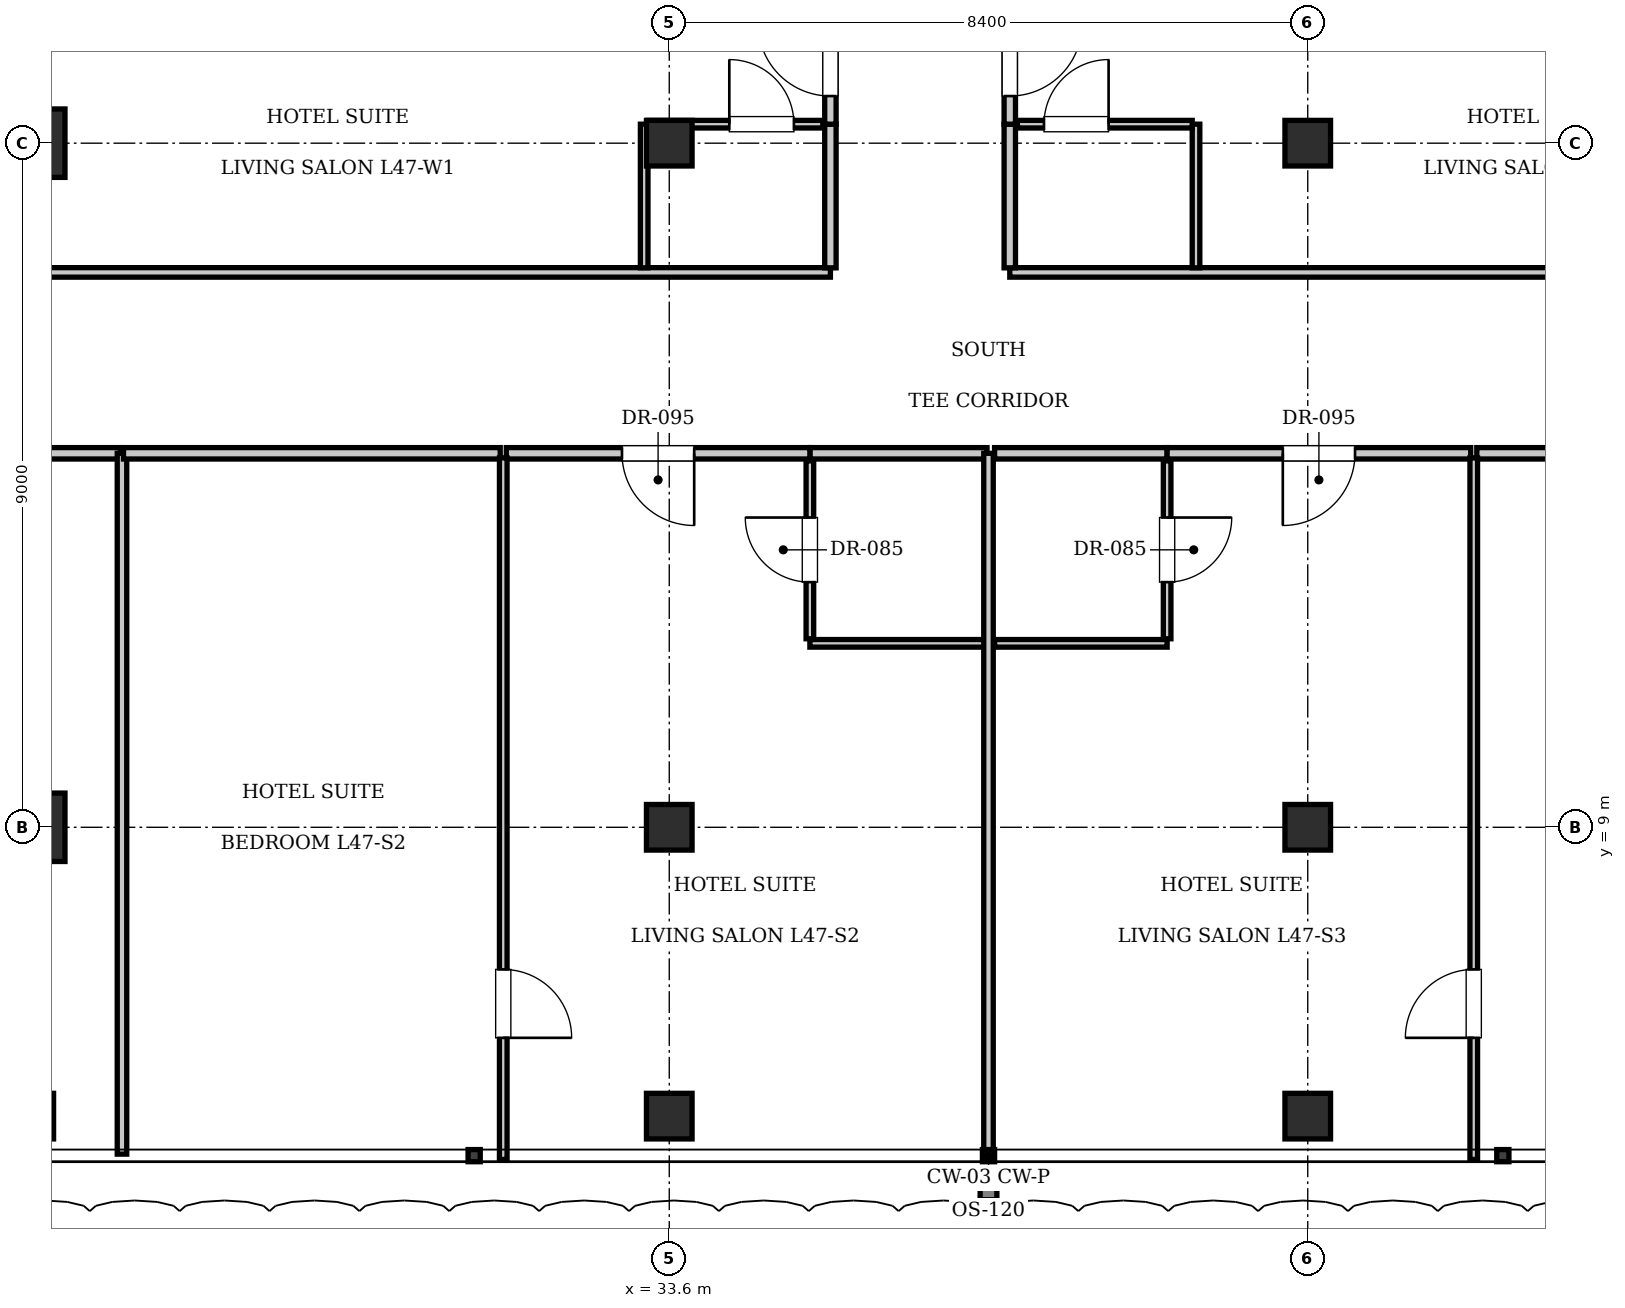
"""IFC4 building model, lengths in metres.
Left out: names, types, materials, properties, quantities, classifications, styles, units other than length and angle.
Written with IfcOpenShell. Run it as: python <this file> out.ifc"""

import sys

from ifc_helpers import new_model, si_unit, direction, frame, frame_2d, origin, origin_2d, place, context, subcontext, project, spatial, rectangle, i_section, extrude, element, fill, save


model = new_model("IFC4")
c1 = context("Model", 3, precision=1e-05, world=origin(), true_north=direction((0.0, 1.0)))
c2 = subcontext(c1, "Body", "Model", "MODEL_VIEW")
j1 = project(units=[si_unit("LENGTHUNIT", "METRE"), si_unit("PLANEANGLEUNIT", "RADIAN")], contexts=[c1])
p1 = place(None, origin())
s1 = spatial("IfcSite", under=j1, at=p1, CompositionType="ELEMENT")
p2 = place(p1, origin())
s2 = spatial("IfcBuilding", under=s1, at=p2, CompositionType="ELEMENT")
p3 = place(p2, frame((0.0, 0.0, 192.85)))
s3 = spatial("IfcBuildingStorey", under=s2, at=p3, CompositionType="ELEMENT", Elevation=192.85)
for number, where, z_axis, x_axis in (
    (1, (25.2, 18.0, 0.0), (0.0, 0.0, 1.0), (1.0, 0.0, 0.0)),
    (2, (25.2, 9.0, 0.0), (0.0, 0.0, 1.0), (1.0, 0.0, 0.0)),
):
    element("IfcColumn", number, at=place(p3, frame(where, z_axis=z_axis, x_axis=x_axis)), inside=s3, PredefinedType="COLUMN", context=c2, shape_type="SweptSolid", body=[
        extrude(rectangle(XDim=0.9, YDim=0.9, at=origin_2d()), origin(), (0.0, 0.0, 1.0), 3.85),
    ])
for number, where, z_axis, x_axis in (
    (3, (33.6, 9.0, 0.0), (0.0, 0.0, 1.0), (1.0, 0.0, 0.0)),
    (4, (42.0, 9.0, 0.0), (0.0, 0.0, 1.0), (1.0, 0.0, 0.0)),
    (5, (33.6, 18.0, 0.0), (0.0, 0.0, 1.0), (1.0, 0.0, 0.0)),
    (6, (42.0, 18.0, 0.0), (0.0, 0.0, 1.0), (1.0, 0.0, 0.0)),
    (7, (25.2, 5.2, 0.0), (0.0, 0.0, 1.0), (1.0, 0.0, 0.0)),
    (8, (33.6, 5.2, 0.0), (0.0, 0.0, 1.0), (1.0, 0.0, 0.0)),
    (9, (42.0, 5.2, 0.0), (0.0, 0.0, 1.0), (1.0, 0.0, 0.0)),
):
    element("IfcColumn", number, at=place(p3, frame(where, z_axis=z_axis, x_axis=x_axis)), inside=s3, PredefinedType="COLUMN", context=c2, shape_type="SweptSolid", body=[
        extrude(i_section(OverallWidth=0.6, OverallDepth=0.6, WebThickness=0.025, FlangeThickness=0.038, at=origin_2d()), origin(), (0.0, 0.0, 1.0), 3.85),
    ])
p4 = place(p3, frame((22.524, 13.92, 0.0), z_axis=(0.0, 0.0, 1.0), x_axis=(1.0, 0.0, 0.0)))
e10 = element("IfcWall", 10, at=p4, inside=s3, PredefinedType="PARTITIONING", context=c2, shape_type="SweptSolid", body=[
    extrude(rectangle(XDim=3.856, YDim=0.15, at=frame_2d((1.928, 0.0))), origin(), (0.0, 0.0, 1.0), 3.61),
])
p5 = place(p3, frame((26.4, 4.7, 0.0), z_axis=(0.0, 0.0, 1.0), x_axis=(0.0, 1.0, 0.0)))
e11 = element("IfcWall", 11, at=p5, inside=s3, PredefinedType="PARTITIONING", context=c2, shape_type="SweptSolid", body=[
    extrude(rectangle(XDim=9.22, YDim=0.125, at=frame_2d((4.61, 0.0))), origin(), (0.0, 0.0, 1.0), 3.61),
])
p6 = place(p3, frame((35.45, 13.92, 0.0), z_axis=(0.0, 0.0, 1.0), x_axis=(1.0, 0.0, 0.0)))
e12 = element("IfcWall", 12, at=p6, inside=s3, PredefinedType="PARTITIONING", context=c2, shape_type="SweptSolid", body=[
    extrude(rectangle(XDim=2.33, YDim=0.15, at=frame_2d((1.165, 0.0))), origin(), (0.0, 0.0, 1.0), 3.61),
])
p7 = place(p3, frame((35.45, 11.42, 0.0), z_axis=(0.0, 0.0, 1.0), x_axis=(1.0, 0.0, 0.0)))
e13 = element("IfcWall", 13, at=p7, inside=s3, PredefinedType="PARTITIONING", context=c2, shape_type="SweptSolid", body=[
    extrude(rectangle(XDim=2.31, YDim=0.1, at=frame_2d((1.155, 0.0))), origin(), (0.0, 0.0, 1.0), 3.61),
])
p8 = place(p3, frame((35.45, 11.48, 0.0), z_axis=(0.0, 0.0, 1.0), x_axis=(0.0, 1.0, 0.0)))
e14 = element("IfcWall", 14, at=p8, inside=s3, PredefinedType="PARTITIONING", context=c2, shape_type="SweptSolid", body=[
    extrude(rectangle(XDim=2.34, YDim=0.1, at=frame_2d((1.17, 0.0))), origin(), (0.0, 0.0, 1.0), 3.61),
])
p9 = place(p8, frame((0.745, 0.0, 0.0)))
e15 = element("IfcOpeningElement", 15, at=p9, cuts=e14, PredefinedType="OPENING", context=c2, shape_type="SweptSolid", body=[
    extrude(rectangle(XDim=0.85, YDim=2.1, at=frame_2d((0.425, 1.05))), frame((0.0, 0.06, 0.0), z_axis=(0.0, -1.0, 0.0), x_axis=(1.0, 0.0, 0.0)), (0.0, 0.0, 1.0), 0.12),
])
p10 = place(p3, frame((26.42, 13.92, 0.0), z_axis=(0.0, 0.0, 1.0), x_axis=(1.0, 0.0, 0.0)))
e16 = element("IfcWall", 16, at=p10, inside=s3, PredefinedType="PARTITIONING", context=c2, shape_type="SweptSolid", body=[
    extrude(rectangle(XDim=4.956, YDim=0.15, at=frame_2d((2.478, 0.0))), origin(), (0.0, 0.0, 1.0), 3.61),
])
p11 = place(p3, frame((31.456, 13.92, 0.0), z_axis=(0.0, 0.0, 1.0), x_axis=(1.0, 0.0, 0.0)))
e17 = element("IfcWall", 17, at=p11, inside=s3, PredefinedType="PARTITIONING", context=c2, shape_type="SweptSolid", body=[
    extrude(rectangle(XDim=3.994, YDim=0.15, at=frame_2d((1.997, 0.0))), origin(), (0.0, 0.0, 1.0), 3.61),
])
p12 = place(p11, frame((1.522, 0.0, 0.0)))
e18 = element("IfcOpeningElement", 18, at=p12, cuts=e17, PredefinedType="OPENING", context=c2, shape_type="SweptSolid", body=[
    extrude(rectangle(XDim=0.95, YDim=2.15, at=frame_2d((0.475, 1.075))), frame((0.0, 0.085, 0.0), z_axis=(0.0, -1.0, 0.0), x_axis=(1.0, 0.0, 0.0)), (0.0, 0.0, 1.0), 0.17),
])
p13 = place(p3, frame((31.416, 4.63, 0.0), z_axis=(0.0, 0.0, 1.0), x_axis=(0.0, 1.0, 0.0)))
e19 = element("IfcWall", 19, at=p13, inside=s3, PredefinedType="PARTITIONING", context=c2, shape_type="SweptSolid", body=[
    extrude(rectangle(XDim=9.23, YDim=0.1, at=frame_2d((4.615, 0.0))), origin(), (0.0, 0.0, 1.0), 3.61),
])
p14 = place(p13, frame((1.6, 0.0, 0.0)))
e20 = element("IfcOpeningElement", 20, at=p14, cuts=e19, PredefinedType="OPENING", context=c2, shape_type="SweptSolid", body=[
    extrude(rectangle(XDim=0.9, YDim=2.1, at=frame_2d((0.45, 1.05))), frame((0.0, 0.06, 0.0), z_axis=(0.0, -1.0, 0.0), x_axis=(1.0, 0.0, 0.0)), (0.0, 0.0, 1.0), 0.12),
])
p15 = place(p3, frame((37.8, 4.7, 0.0), z_axis=(0.0, 0.0, 1.0), x_axis=(0.0, 1.0, 0.0)))
e21 = element("IfcWall", 21, at=p15, inside=s3, PredefinedType="PARTITIONING", context=c2, shape_type="SweptSolid", body=[
    extrude(rectangle(XDim=9.22, YDim=0.125, at=frame_2d((4.61, 0.0))), origin(), (0.0, 0.0, 1.0), 3.3),
])
p16 = place(p3, frame((37.88, 13.92, 0.0), z_axis=(0.0, 0.0, 1.0), x_axis=(1.0, 0.0, 0.0)))
e22 = element("IfcWall", 22, at=p16, inside=s3, PredefinedType="PARTITIONING", context=c2, shape_type="SweptSolid", body=[
    extrude(rectangle(XDim=2.27, YDim=0.15, at=frame_2d((1.135, 0.0))), origin(), (0.0, 0.0, 1.0), 3.61),
])
p17 = place(p3, frame((37.88, 11.42, 0.0), z_axis=(0.0, 0.0, 1.0), x_axis=(1.0, 0.0, 0.0)))
e23 = element("IfcWall", 23, at=p17, inside=s3, PredefinedType="PARTITIONING", context=c2, shape_type="SweptSolid", body=[
    extrude(rectangle(XDim=2.27, YDim=0.1, at=frame_2d((1.135, 0.0))), origin(), (0.0, 0.0, 1.0), 3.61),
])
p18 = place(p3, frame((40.15, 11.48, 0.0), z_axis=(0.0, 0.0, 1.0), x_axis=(0.0, 1.0, 0.0)))
e24 = element("IfcWall", 24, at=p18, inside=s3, PredefinedType="PARTITIONING", context=c2, shape_type="SweptSolid", body=[
    extrude(rectangle(XDim=2.34, YDim=0.1, at=frame_2d((1.17, 0.0))), origin(), (0.0, 0.0, 1.0), 3.61),
])
p19 = place(p18, frame((0.745, 0.0, 0.0)))
e25 = element("IfcOpeningElement", 25, at=p19, cuts=e24, PredefinedType="OPENING", context=c2, shape_type="SweptSolid", body=[
    extrude(rectangle(XDim=0.85, YDim=2.1, at=frame_2d((0.425, 1.05))), frame((0.0, 0.06, 0.0), z_axis=(0.0, -1.0, 0.0), x_axis=(1.0, 0.0, 0.0)), (0.0, 0.0, 1.0), 0.12),
])
p20 = place(p3, frame((40.15, 13.92, 0.0), z_axis=(0.0, 0.0, 1.0), x_axis=(1.0, 0.0, 0.0)))
e26 = element("IfcWall", 26, at=p20, inside=s3, PredefinedType="PARTITIONING", context=c2, shape_type="SweptSolid", body=[
    extrude(rectangle(XDim=3.994, YDim=0.15, at=frame_2d((1.997, 0.0))), origin(), (0.0, 0.0, 1.0), 3.61),
])
p21 = place(p20, frame((1.522, 0.0, 0.0)))
e27 = element("IfcOpeningElement", 27, at=p21, cuts=e26, PredefinedType="OPENING", context=c2, shape_type="SweptSolid", body=[
    extrude(rectangle(XDim=0.95, YDim=2.15, at=frame_2d((0.475, 1.075))), frame((0.0, 0.085, 0.0), z_axis=(0.0, -1.0, 0.0), x_axis=(1.0, 0.0, 0.0)), (0.0, 0.0, 1.0), 0.17),
])
p22 = place(p3, frame((44.224, 13.92, 0.0), z_axis=(0.0, 0.0, 1.0), x_axis=(1.0, 0.0, 0.0)))
e28 = element("IfcWall", 28, at=p22, inside=s3, PredefinedType="PARTITIONING", context=c2, shape_type="SweptSolid", body=[
    extrude(rectangle(XDim=4.956, YDim=0.15, at=frame_2d((2.478, 0.0))), origin(), (0.0, 0.0, 1.0), 3.61),
])
p23 = place(p3, frame((44.184, 4.63, 0.0), z_axis=(0.0, 0.0, 1.0), x_axis=(0.0, 1.0, 0.0)))
e29 = element("IfcWall", 29, at=p23, inside=s3, PredefinedType="PARTITIONING", context=c2, shape_type="SweptSolid", body=[
    extrude(rectangle(XDim=9.23, YDim=0.1, at=frame_2d((4.615, 0.0))), origin(), (0.0, 0.0, 1.0), 3.61),
])
p24 = place(p23, frame((1.6, 0.0, 0.0)))
e30 = element("IfcOpeningElement", 30, at=p24, cuts=e29, PredefinedType="OPENING", context=c2, shape_type="SweptSolid", body=[
    extrude(rectangle(XDim=0.9, YDim=2.1, at=frame_2d((0.45, 1.05))), frame((0.0, 0.06, 0.0), z_axis=(0.0, -1.0, 0.0), x_axis=(1.0, 0.0, 0.0)), (0.0, 0.0, 1.0), 0.12),
])
p25 = place(p3, frame((13.2, 16.3, 0.0), z_axis=(0.0, 0.0, 1.0), x_axis=(1.0, 0.0, 0.0)))
e31 = element("IfcWall", 31, at=p25, inside=s3, PredefinedType="PARTITIONING", context=c2, shape_type="SweptSolid", body=[
    extrude(rectangle(XDim=22.52, YDim=0.125, at=frame_2d((11.26, 0.0))), origin(), (0.0, 0.0, 1.0), 3.61),
])
p26 = place(p3, frame((38.08, 16.3, 0.0), z_axis=(0.0, 0.0, 1.0), x_axis=(1.0, 0.0, 0.0)))
e32 = element("IfcWall", 32, at=p26, inside=s3, PredefinedType="PARTITIONING", context=c2, shape_type="SweptSolid", body=[
    extrude(rectangle(XDim=24.32, YDim=0.125, at=frame_2d((12.16, 0.0))), origin(), (0.0, 0.0, 1.0), 3.61),
])
p27 = place(p3, frame((35.72, 16.36, 0.0), z_axis=(0.0, 0.0, 1.0), x_axis=(0.0, 1.0, 0.0)))
e33 = element("IfcWall", 33, at=p27, inside=s3, PredefinedType="PARTITIONING", context=c2, shape_type="SweptSolid", body=[
    extrude(rectangle(XDim=1.89, YDim=0.15, at=frame_2d((0.945, 0.0))), origin(), (0.0, 0.0, 1.0), 3.61),
])
p28 = place(p3, frame((35.72, 18.25, 0.0), z_axis=(0.0, 0.0, 1.0), x_axis=(0.0, 1.0, 0.0)))
e34 = element("IfcWall", 34, at=p28, inside=s3, PredefinedType="PARTITIONING", context=c2, shape_type="SweptSolid", body=[
    extrude(rectangle(XDim=1.69, YDim=0.15, at=frame_2d((0.845, 0.0))), origin(), (0.0, 0.0, 1.0), 3.61),
])
p29 = place(p28, frame((0.37, 0.0, 0.0)))
e35 = element("IfcOpeningElement", 35, at=p29, cuts=e34, PredefinedType="OPENING", context=c2, shape_type="SweptSolid", body=[
    extrude(rectangle(XDim=0.95, YDim=2.15, at=frame_2d((0.475, 1.075))), frame((0.0, 0.085, 0.0), z_axis=(0.0, -1.0, 0.0), x_axis=(1.0, 0.0, 0.0)), (0.0, 0.0, 1.0), 0.17),
])
p30 = place(p3, frame((33.27, 16.36, 0.0), z_axis=(0.0, 0.0, 1.0), x_axis=(0.0, 1.0, 0.0)))
e36 = element("IfcWall", 36, at=p30, inside=s3, PredefinedType="PARTITIONING", context=c2, shape_type="SweptSolid", body=[
    extrude(rectangle(XDim=1.89, YDim=0.1, at=frame_2d((0.945, 0.0))), origin(), (0.0, 0.0, 1.0), 3.61),
])
p31 = place(p3, frame((33.32, 18.25, 0.0), z_axis=(0.0, 0.0, 1.0), x_axis=(1.0, 0.0, 0.0)))
e37 = element("IfcWall", 37, at=p31, inside=s3, PredefinedType="PARTITIONING", context=c2, shape_type="SweptSolid", body=[
    extrude(rectangle(XDim=2.3, YDim=0.1, at=frame_2d((1.15, 0.0))), origin(), (0.0, 0.0, 1.0), 3.61),
])
p32 = place(p31, frame((1.07, 0.0, 0.0)))
e38 = element("IfcOpeningElement", 38, at=p32, cuts=e37, PredefinedType="OPENING", context=c2, shape_type="SweptSolid", body=[
    extrude(rectangle(XDim=0.85, YDim=2.1, at=frame_2d((0.425, 1.05))), frame((0.0, 0.06, 0.0), z_axis=(0.0, -1.0, 0.0), x_axis=(1.0, 0.0, 0.0)), (0.0, 0.0, 1.0), 0.12),
])
p33 = place(p3, frame((38.08, 16.36, 0.0), z_axis=(0.0, 0.0, 1.0), x_axis=(0.0, 1.0, 0.0)))
e39 = element("IfcWall", 39, at=p33, inside=s3, PredefinedType="PARTITIONING", context=c2, shape_type="SweptSolid", body=[
    extrude(rectangle(XDim=1.89, YDim=0.15, at=frame_2d((0.945, 0.0))), origin(), (0.0, 0.0, 1.0), 3.61),
])
p34 = place(p3, frame((38.08, 18.25, 0.0), z_axis=(0.0, 0.0, 1.0), x_axis=(0.0, 1.0, 0.0)))
e40 = element("IfcWall", 40, at=p34, inside=s3, PredefinedType="PARTITIONING", context=c2, shape_type="SweptSolid", body=[
    extrude(rectangle(XDim=1.69, YDim=0.15, at=frame_2d((0.845, 0.0))), origin(), (0.0, 0.0, 1.0), 3.61),
])
p35 = place(p34, frame((0.37, 0.0, 0.0)))
e41 = element("IfcOpeningElement", 41, at=p35, cuts=e40, PredefinedType="OPENING", context=c2, shape_type="SweptSolid", body=[
    extrude(rectangle(XDim=0.95, YDim=2.15, at=frame_2d((0.475, 1.075))), frame((0.0, 0.085, 0.0), z_axis=(0.0, -1.0, 0.0), x_axis=(1.0, 0.0, 0.0)), (0.0, 0.0, 1.0), 0.17),
])
p36 = place(p3, frame((40.53, 16.36, 0.0), z_axis=(0.0, 0.0, 1.0), x_axis=(0.0, 1.0, 0.0)))
e42 = element("IfcWall", 42, at=p36, inside=s3, PredefinedType="PARTITIONING", context=c2, shape_type="SweptSolid", body=[
    extrude(rectangle(XDim=1.89, YDim=0.1, at=frame_2d((0.945, 0.0))), origin(), (0.0, 0.0, 1.0), 3.61),
])
p37 = place(p3, frame((38.18, 18.25, 0.0), z_axis=(0.0, 0.0, 1.0), x_axis=(1.0, 0.0, 0.0)))
e43 = element("IfcWall", 43, at=p37, inside=s3, PredefinedType="PARTITIONING", context=c2, shape_type="SweptSolid", body=[
    extrude(rectangle(XDim=2.3, YDim=0.1, at=frame_2d((1.15, 0.0))), origin(), (0.0, 0.0, 1.0), 3.61),
])
p38 = place(p37, frame((0.35, 0.0, 0.0)))
e44 = element("IfcOpeningElement", 44, at=p38, cuts=e43, PredefinedType="OPENING", context=c2, shape_type="SweptSolid", body=[
    extrude(rectangle(XDim=0.85, YDim=2.1, at=frame_2d((0.425, 1.05))), frame((0.0, 0.06, 0.0), z_axis=(0.0, -1.0, 0.0), x_axis=(1.0, 0.0, 0.0)), (0.0, 0.0, 1.0), 0.12),
])
p39 = place(p9, origin())
e45 = element("IfcDoor", 45, at=p39, inside=s3, OperationType="SINGLE_SWING_RIGHT", PredefinedType="DOOR", context=c2, shape_type="SweptSolid", body=[
    extrude(rectangle(XDim=0.85, YDim=2.1, at=frame_2d((0.425, 1.05))), frame((0.0, 0.025, 0.0), z_axis=(0.0, -1.0, 0.0), x_axis=(1.0, 0.0, 0.0)), (0.0, 0.0, 1.0), 0.05),
])
fill(e15, e45)
p40 = place(p12, frame((0.95, 0.0, 0.0), z_axis=(0.0, 0.0, 1.0), x_axis=(-1.0, 0.0, 0.0)))
e46 = element("IfcDoor", 46, at=p40, inside=s3, OperationType="SINGLE_SWING_LEFT", PredefinedType="DOOR", context=c2, shape_type="SweptSolid", body=[
    extrude(rectangle(XDim=0.95, YDim=2.15, at=frame_2d((0.475, 1.075))), frame((0.0, 0.025, 0.0), z_axis=(0.0, -1.0, 0.0), x_axis=(1.0, 0.0, 0.0)), (0.0, 0.0, 1.0), 0.05),
])
fill(e18, e46)
p41 = place(p14, frame((0.9, 0.0, 0.0), z_axis=(0.0, 0.0, 1.0), x_axis=(-1.0, 0.0, 0.0)))
e47 = element("IfcDoor", 47, at=p41, inside=s3, OperationType="SINGLE_SWING_RIGHT", PredefinedType="DOOR", context=c2, shape_type="SweptSolid", body=[
    extrude(rectangle(XDim=0.9, YDim=2.1, at=frame_2d((0.45, 1.05))), frame((0.0, 0.025, 0.0), z_axis=(0.0, -1.0, 0.0), x_axis=(1.0, 0.0, 0.0)), (0.0, 0.0, 1.0), 0.05),
])
fill(e20, e47)
p42 = place(p19, frame((0.85, 0.0, 0.0), z_axis=(0.0, 0.0, 1.0), x_axis=(-1.0, 0.0, 0.0)))
e48 = element("IfcDoor", 48, at=p42, inside=s3, OperationType="SINGLE_SWING_LEFT", PredefinedType="DOOR", context=c2, shape_type="SweptSolid", body=[
    extrude(rectangle(XDim=0.85, YDim=2.1, at=frame_2d((0.425, 1.05))), frame((0.0, 0.025, 0.0), z_axis=(0.0, -1.0, 0.0), x_axis=(1.0, 0.0, 0.0)), (0.0, 0.0, 1.0), 0.05),
])
fill(e25, e48)
p43 = place(p21, frame((0.95, 0.0, 0.0), z_axis=(0.0, 0.0, 1.0), x_axis=(-1.0, 0.0, 0.0)))
e49 = element("IfcDoor", 49, at=p43, inside=s3, OperationType="SINGLE_SWING_RIGHT", PredefinedType="DOOR", context=c2, shape_type="SweptSolid", body=[
    extrude(rectangle(XDim=0.95, YDim=2.15, at=frame_2d((0.475, 1.075))), frame((0.0, 0.025, 0.0), z_axis=(0.0, -1.0, 0.0), x_axis=(1.0, 0.0, 0.0)), (0.0, 0.0, 1.0), 0.05),
])
fill(e27, e49)
p44 = place(p24, origin())
e50 = element("IfcDoor", 50, at=p44, inside=s3, OperationType="SINGLE_SWING_LEFT", PredefinedType="DOOR", context=c2, shape_type="SweptSolid", body=[
    extrude(rectangle(XDim=0.9, YDim=2.1, at=frame_2d((0.45, 1.05))), frame((0.0, 0.025, 0.0), z_axis=(0.0, -1.0, 0.0), x_axis=(1.0, 0.0, 0.0)), (0.0, 0.0, 1.0), 0.05),
])
fill(e30, e50)
p45 = place(p32, origin())
e51 = element("IfcDoor", 51, at=p45, inside=s3, OperationType="SINGLE_SWING_LEFT", PredefinedType="DOOR", context=c2, shape_type="SweptSolid", body=[
    extrude(rectangle(XDim=0.85, YDim=2.1, at=frame_2d((0.425, 1.05))), frame((0.0, 0.025, 0.0), z_axis=(0.0, -1.0, 0.0), x_axis=(1.0, 0.0, 0.0)), (0.0, 0.0, 1.0), 0.05),
])
fill(e38, e51)
p46 = place(p29, origin())
e52 = element("IfcDoor", 52, at=p46, inside=s3, OperationType="SINGLE_SWING_RIGHT", PredefinedType="DOOR", context=c2, shape_type="SweptSolid", body=[
    extrude(rectangle(XDim=0.95, YDim=2.15, at=frame_2d((0.475, 1.075))), frame((0.0, 0.025, 0.0), z_axis=(0.0, -1.0, 0.0), x_axis=(1.0, 0.0, 0.0)), (0.0, 0.0, 1.0), 0.05),
])
fill(e35, e52)
p47 = place(p38, origin())
e53 = element("IfcDoor", 53, at=p47, inside=s3, OperationType="SINGLE_SWING_RIGHT", PredefinedType="DOOR", context=c2, shape_type="SweptSolid", body=[
    extrude(rectangle(XDim=0.85, YDim=2.1, at=frame_2d((0.425, 1.05))), frame((0.0, 0.025, 0.0), z_axis=(0.0, -1.0, 0.0), x_axis=(1.0, 0.0, 0.0)), (0.0, 0.0, 1.0), 0.05),
])
fill(e44, e53)
p48 = place(p35, frame((0.95, 0.0, 0.0), z_axis=(0.0, 0.0, 1.0), x_axis=(-1.0, 0.0, 0.0)))
e54 = element("IfcDoor", 54, at=p48, inside=s3, OperationType="SINGLE_SWING_LEFT", PredefinedType="DOOR", context=c2, shape_type="SweptSolid", body=[
    extrude(rectangle(XDim=0.95, YDim=2.15, at=frame_2d((0.475, 1.075))), frame((0.0, 0.025, 0.0), z_axis=(0.0, -1.0, 0.0), x_axis=(1.0, 0.0, 0.0)), (0.0, 0.0, 1.0), 0.05),
])
fill(e41, e54)
save(model, sys.argv[1])
